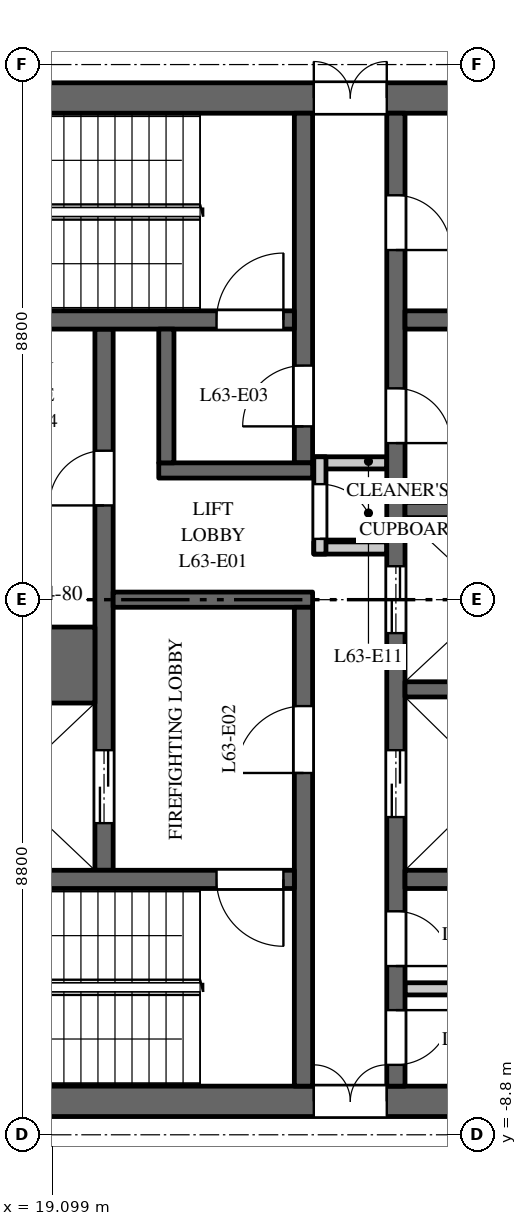
"""IFC4 building model, lengths in metres.
Left out: names, types, materials, properties, quantities, classifications, styles, units other than length and angle.
Written with IfcOpenShell. Run it as: python <this file> out.ifc"""

import sys

from ifc_helpers import new_model, si_unit, direction, frame, frame_2d, origin, place, context, subcontext, project, spatial, rectangle, extrude, element, fill, save


model = new_model("IFC4")
c1 = context("Model", 3, precision=1e-05, world=origin(), true_north=direction((0.0, 1.0)))
c2 = subcontext(c1, "Body", "Model", "MODEL_VIEW")
j1 = project(units=[si_unit("LENGTHUNIT", "METRE"), si_unit("PLANEANGLEUNIT", "RADIAN")], contexts=[c1])
p1 = place(None, origin())
s1 = spatial("IfcSite", under=j1, at=p1, CompositionType="ELEMENT")
p2 = place(p1, origin())
s2 = spatial("IfcBuilding", under=s1, at=p2, CompositionType="ELEMENT")
p3 = place(p2, frame((0.0, 0.0, 295.0)))
s3 = spatial("IfcBuildingStorey", under=s2, at=p3, CompositionType="ELEMENT", Elevation=295.0)
p4 = place(p3, frame((16.5, 8.25, 0.0), z_axis=(0.0, 0.0, 1.0), x_axis=(1.0, 0.0, 0.0)))
e1 = element("IfcWall", 1, at=p4, inside=s3, PredefinedType="SHEAR", context=c2, shape_type="SweptSolid", body=[
    extrude(rectangle(XDim=15.0, YDim=0.5, at=frame_2d((7.5, 0.0))), origin(), (0.0, 0.0, 1.0), 3.7),
])
p5 = place(p4, frame((6.9, 0.0, 0.0)))
e2 = element("IfcOpeningElement", 2, at=p5, cuts=e1, PredefinedType="OPENING", context=c2, shape_type="SweptSolid", body=[
    extrude(rectangle(XDim=1.2, YDim=2.1, at=frame_2d((0.6, 1.05))), frame((0.0, 0.26, 0.0), z_axis=(0.0, -1.0, 0.0), x_axis=(1.0, 0.0, 0.0)), (0.0, 0.0, 1.0), 0.52),
])
p6 = place(p4, frame((12.95, 0.0, 0.0)))
e3 = element("IfcOpeningElement", 3, at=p6, cuts=e1, PredefinedType="OPENING", context=c2, shape_type="SweptSolid", body=[
    extrude(rectangle(XDim=0.9, YDim=2.1, at=frame_2d((0.45, 1.05))), frame((0.0, 0.26, 0.0), z_axis=(0.0, -1.0, 0.0), x_axis=(1.0, 0.0, 0.0)), (0.0, 0.0, 1.0), 0.52),
])
p7 = place(p3, frame((16.5, -8.25, 0.0), z_axis=(0.0, 0.0, 1.0), x_axis=(1.0, 0.0, 0.0)))
e4 = element("IfcWall", 4, at=p7, inside=s3, PredefinedType="SHEAR", context=c2, shape_type="SweptSolid", body=[
    extrude(rectangle(XDim=15.0, YDim=0.5, at=frame_2d((7.5, 0.0))), origin(), (0.0, 0.0, 1.0), 3.7),
])
p8 = place(p7, frame((6.9, 0.0, 0.0)))
e5 = element("IfcOpeningElement", 5, at=p8, cuts=e4, PredefinedType="OPENING", context=c2, shape_type="SweptSolid", body=[
    extrude(rectangle(XDim=1.2, YDim=2.1, at=frame_2d((0.6, 1.05))), frame((0.0, 0.26, 0.0), z_axis=(0.0, -1.0, 0.0), x_axis=(1.0, 0.0, 0.0)), (0.0, 0.0, 1.0), 0.52),
])
p9 = place(p7, frame((12.275, 0.0, 0.0)))
e6 = element("IfcOpeningElement", 6, at=p9, cuts=e4, PredefinedType="OPENING", context=c2, shape_type="SweptSolid", body=[
    extrude(rectangle(XDim=0.9, YDim=2.1, at=frame_2d((0.45, 1.05))), frame((0.0, 0.26, 0.0), z_axis=(0.0, -1.0, 0.0), x_axis=(1.0, 0.0, 0.0)), (0.0, 0.0, 1.0), 0.52),
])
p10 = place(p3, frame((19.95, -4.45, 0.0), z_axis=(0.0, 0.0, 1.0), x_axis=(0.0, 1.0, 0.0)))
e7 = element("IfcWall", 7, at=p10, inside=s3, PredefinedType="SHEAR", context=c2, shape_type="SweptSolid", body=[
    extrude(rectangle(XDim=8.9, YDim=0.3, at=frame_2d((4.45, 0.0))), origin(), (0.0, 0.0, 1.0), 3.7),
])
p11 = place(p10, frame((0.775, 0.0, 0.0)))
e8 = element("IfcOpeningElement", 8, at=p11, cuts=e7, PredefinedType="OPENING", context=c2, shape_type="SweptSolid", body=[
    extrude(rectangle(XDim=1.2, YDim=2.1, at=frame_2d((0.6, 1.05))), frame((0.0, 0.16, 0.0), z_axis=(0.0, -1.0, 0.0), x_axis=(1.0, 0.0, 0.0)), (0.0, 0.0, 1.0), 0.32),
])
p12 = place(p10, frame((6.0, 0.0, 0.0)))
e9 = element("IfcOpeningElement", 9, at=p12, cuts=e7, PredefinedType="OPENING", context=c2, shape_type="SweptSolid", body=[
    extrude(rectangle(XDim=0.9, YDim=2.1, at=frame_2d((0.45, 1.05))), frame((0.0, 0.16, 0.0), z_axis=(0.0, -1.0, 0.0), x_axis=(1.0, 0.0, 0.0)), (0.0, 0.0, 1.0), 0.32),
])
p13 = place(p3, frame((24.75, -8.0, 0.0), z_axis=(0.0, 0.0, 1.0), x_axis=(0.0, 1.0, 0.0)))
e10 = element("IfcWall", 10, at=p13, inside=s3, PredefinedType="SHEAR", context=c2, shape_type="SweptSolid", body=[
    extrude(rectangle(XDim=16.0, YDim=0.3, at=frame_2d((8.0, 0.0))), origin(), (0.0, 0.0, 1.0), 3.7),
])
p14 = place(p13, frame((4.425, 0.0, 0.0)))
e11 = element("IfcOpeningElement", 11, at=p14, cuts=e10, PredefinedType="OPENING", context=c2, shape_type="SweptSolid", body=[
    extrude(rectangle(XDim=1.1, YDim=2.1, at=frame_2d((0.55, 1.05))), frame((0.0, 0.16, 0.0), z_axis=(0.0, -1.0, 0.0), x_axis=(1.0, 0.0, 0.0)), (0.0, 0.0, 1.0), 0.32),
])
p15 = place(p13, frame((7.45, 0.0, 0.0)))
e12 = element("IfcOpeningElement", 12, at=p15, cuts=e10, PredefinedType="OPENING", context=c2, shape_type="SweptSolid", body=[
    extrude(rectangle(XDim=1.1, YDim=2.1, at=frame_2d((0.55, 1.05))), frame((0.0, 0.16, 0.0), z_axis=(0.0, -1.0, 0.0), x_axis=(1.0, 0.0, 0.0)), (0.0, 0.0, 1.0), 0.32),
])
p16 = place(p13, frame((10.575, 0.0, 0.0)))
e13 = element("IfcOpeningElement", 13, at=p16, cuts=e10, PredefinedType="OPENING", context=c2, shape_type="SweptSolid", body=[
    extrude(rectangle(XDim=0.9, YDim=2.1, at=frame_2d((0.45, 1.05))), frame((0.0, 0.16, 0.0), z_axis=(0.0, -1.0, 0.0), x_axis=(1.0, 0.0, 0.0)), (0.0, 0.0, 1.0), 0.32),
])
p17 = place(p13, frame((13.75, 0.0, 0.0)))
e14 = element("IfcOpeningElement", 14, at=p17, cuts=e10, PredefinedType="OPENING", context=c2, shape_type="SweptSolid", body=[
    extrude(rectangle(XDim=0.9, YDim=2.1, at=frame_2d((0.45, 1.05))), frame((0.0, 0.16, 0.0), z_axis=(0.0, -1.0, 0.0), x_axis=(1.0, 0.0, 0.0)), (0.0, 0.0, 1.0), 0.32),
])
p18 = place(p13, frame((1.975, 0.0, 0.0)))
e15 = element("IfcOpeningElement", 15, at=p18, cuts=e10, PredefinedType="OPENING", context=c2, shape_type="SweptSolid", body=[
    extrude(rectangle(XDim=0.9, YDim=2.1, at=frame_2d((0.45, 1.05))), frame((0.0, 0.16, 0.0), z_axis=(0.0, -1.0, 0.0), x_axis=(1.0, 0.0, 0.0)), (0.0, 0.0, 1.0), 0.32),
])
p19 = place(p13, frame((0.35, 0.0, 0.0)))
e16 = element("IfcOpeningElement", 16, at=p19, cuts=e10, PredefinedType="OPENING", context=c2, shape_type="SweptSolid", body=[
    extrude(rectangle(XDim=0.9, YDim=2.1, at=frame_2d((0.45, 1.05))), frame((0.0, 0.16, 0.0), z_axis=(0.0, -1.0, 0.0), x_axis=(1.0, 0.0, 0.0)), (0.0, 0.0, 1.0), 0.32),
])
p20 = place(p3, frame((20.1, 0.0, 0.0), z_axis=(0.0, 0.0, 1.0), x_axis=(1.0, 0.0, 0.0)))
e17 = element("IfcWall", 17, at=p20, inside=s3, PredefinedType="SHEAR", context=c2, shape_type="SweptSolid", body=[
    extrude(rectangle(XDim=3.28, YDim=0.25, at=frame_2d((1.64, 0.0))), origin(), (0.0, 0.0, 1.0), 3.7),
])
for number, where, z_axis, x_axis in (
    (18, (23.4, 0.85, 0.0), (0.0, 0.0, 1.0), (1.0, 0.0, 0.0)),
    (19, (23.4, 2.25, 0.0), (0.0, 0.0, 1.0), (1.0, 0.0, 0.0)),
):
    element("IfcWall", number, at=place(p3, frame(where, z_axis=z_axis, x_axis=x_axis)), inside=s3, PredefinedType="PARTITIONING", context=c2, shape_type="SweptSolid", body=[
        extrude(rectangle(XDim=1.2, YDim=0.2, at=frame_2d((0.6, 0.0))), origin(), (0.0, 0.0, 1.0), 3.7),
    ])
p21 = place(p3, frame((23.5, 0.75, 0.0), z_axis=(0.0, 0.0, 1.0), x_axis=(0.0, 1.0, 0.0)))
e20 = element("IfcWall", 20, at=p21, inside=s3, PredefinedType="PARTITIONING", context=c2, shape_type="SweptSolid", body=[
    extrude(rectangle(XDim=1.6, YDim=0.2, at=frame_2d((0.8, 0.0))), origin(), (0.0, 0.0, 1.0), 3.7),
])
p22 = place(p21, frame((0.25, 0.0, 0.0)))
e21 = element("IfcOpeningElement", 21, at=p22, cuts=e20, PredefinedType="OPENING", context=c2, shape_type="SweptSolid", body=[
    extrude(rectangle(XDim=0.9, YDim=2.1, at=frame_2d((0.45, 1.05))), frame((0.0, 0.11, 0.0), z_axis=(0.0, -1.0, 0.0), x_axis=(1.0, 0.0, 0.0)), (0.0, 0.0, 1.0), 0.22),
])
p23 = place(p3, frame((24.9, 4.6, 0.0), z_axis=(0.0, 0.0, 1.0), x_axis=(1.0, 0.0, 0.0)))
e22 = element("IfcWall", 22, at=p23, inside=s3, PredefinedType="SHEAR", context=c2, shape_type="SweptSolid", body=[
    extrude(rectangle(XDim=6.1, YDim=0.3, at=frame_2d((3.05, 0.0))), origin(), (0.0, 0.0, 1.0), 3.7),
])
p24 = place(p3, frame((24.9, -6.4, 0.0), z_axis=(0.0, 0.0, 1.0), x_axis=(1.0, 0.0, 0.0)))
e23 = element("IfcWall", 23, at=p24, inside=s3, PredefinedType="PARTITIONING", context=c2, shape_type="SweptSolid", body=[
    extrude(rectangle(XDim=2.35, YDim=0.2, at=frame_2d((1.175, 0.0))), origin(), (0.0, 0.0, 1.0), 3.7),
])
p25 = place(p3, frame((24.9, -4.6, 0.0), z_axis=(0.0, 0.0, 1.0), x_axis=(1.0, 0.0, 0.0)))
e24 = element("IfcWall", 24, at=p25, inside=s3, PredefinedType="SHEAR", context=c2, shape_type="SweptSolid", body=[
    extrude(rectangle(XDim=6.1, YDim=0.3, at=frame_2d((3.05, 0.0))), origin(), (0.0, 0.0, 1.0), 3.7),
])
p26 = place(p25, frame((4.2, 0.0, 0.0)))
e25 = element("IfcOpeningElement", 25, at=p26, cuts=e24, PredefinedType="OPENING", context=c2, shape_type="SweptSolid", body=[
    extrude(rectangle(XDim=0.9, YDim=2.1, at=frame_2d((0.45, 1.05))), frame((0.0, 0.16, 0.0), z_axis=(0.0, -1.0, 0.0), x_axis=(1.0, 0.0, 0.0)), (0.0, 0.0, 1.0), 0.32),
])
p27 = place(p3, frame((16.9, -1.075, 0.0), z_axis=(0.0, 0.0, 1.0), x_axis=(1.0, 0.0, 0.0)))
e26 = element("IfcWall", 26, at=p27, inside=s3, PredefinedType="SHEAR", context=c2, shape_type="SweptSolid", body=[
    extrude(rectangle(XDim=2.9, YDim=1.25, at=frame_2d((1.45, 0.0))), origin(), (0.0, 0.0, 1.0), 3.7),
])
for number, where, z_axis, x_axis in (
    (27, (24.9, -1.475, 0.0), (0.0, 0.0, 1.0), (1.0, 0.0, 0.0)),
    (28, (24.9, 1.475, 0.0), (0.0, 0.0, 1.0), (1.0, 0.0, 0.0)),
):
    element("IfcWall", number, at=place(p3, frame(where, z_axis=z_axis, x_axis=x_axis)), inside=s3, PredefinedType="SHEAR", context=c2, shape_type="SweptSolid", body=[
        extrude(rectangle(XDim=2.9, YDim=0.25, at=frame_2d((1.45, 0.0))), origin(), (0.0, 0.0, 1.0), 3.7),
    ])
p28 = place(p3, frame((23.23, 2.25, 0.0), z_axis=(0.0, 0.0, 1.0), x_axis=(0.0, 1.0, 0.0)))
e29 = element("IfcWall", 29, at=p28, inside=s3, PredefinedType="SHEAR", context=c2, shape_type="SweptSolid", body=[
    extrude(rectangle(XDim=5.75, YDim=0.3, at=frame_2d((2.875, 0.0))), origin(), (0.0, 0.0, 1.0), 3.7),
])
p29 = place(p28, frame((0.6, 0.0, 0.0)))
e30 = element("IfcOpeningElement", 30, at=p29, cuts=e29, PredefinedType="OPENING", context=c2, shape_type="SweptSolid", body=[
    extrude(rectangle(XDim=1.0, YDim=2.1, at=frame_2d((0.5, 1.05))), frame((0.0, 0.16, 0.0), z_axis=(0.0, -1.0, 0.0), x_axis=(1.0, 0.0, 0.0)), (0.0, 0.0, 1.0), 0.32),
])
p30 = place(p3, frame((23.23, -8.0, 0.0), z_axis=(0.0, 0.0, 1.0), x_axis=(0.0, 1.0, 0.0)))
e31 = element("IfcWall", 31, at=p30, inside=s3, PredefinedType="SHEAR", context=c2, shape_type="SweptSolid", body=[
    extrude(rectangle(XDim=7.875, YDim=0.3, at=frame_2d((3.938, 0.0))), origin(), (0.0, 0.0, 1.0), 3.7),
])
p31 = place(p30, frame((5.15, 0.0, 0.0)))
e32 = element("IfcOpeningElement", 32, at=p31, cuts=e31, PredefinedType="OPENING", context=c2, shape_type="SweptSolid", body=[
    extrude(rectangle(XDim=1.1, YDim=2.1, at=frame_2d((0.55, 1.05))), frame((0.0, 0.16, 0.0), z_axis=(0.0, -1.0, 0.0), x_axis=(1.0, 0.0, 0.0)), (0.0, 0.0, 1.0), 0.32),
])
p32 = place(p3, frame((16.9, 4.6, 0.0), z_axis=(0.0, 0.0, 1.0), x_axis=(1.0, 0.0, 0.0)))
e33 = element("IfcWall", 33, at=p32, inside=s3, PredefinedType="SHEAR", context=c2, shape_type="SweptSolid", body=[
    extrude(rectangle(XDim=6.18, YDim=0.3, at=frame_2d((3.09, 0.0))), origin(), (0.0, 0.0, 1.0), 3.7),
])
p33 = place(p32, frame((4.9, 0.0, 0.0)))
e34 = element("IfcOpeningElement", 34, at=p33, cuts=e33, PredefinedType="OPENING", context=c2, shape_type="SweptSolid", body=[
    extrude(rectangle(XDim=1.1, YDim=2.1, at=frame_2d((0.55, 1.05))), frame((0.0, 0.16, 0.0), z_axis=(0.0, -1.0, 0.0), x_axis=(1.0, 0.0, 0.0)), (0.0, 0.0, 1.0), 0.32),
])
p34 = place(p3, frame((16.9, -4.6, 0.0), z_axis=(0.0, 0.0, 1.0), x_axis=(1.0, 0.0, 0.0)))
e35 = element("IfcWall", 35, at=p34, inside=s3, PredefinedType="SHEAR", context=c2, shape_type="SweptSolid", body=[
    extrude(rectangle(XDim=6.18, YDim=0.3, at=frame_2d((3.09, 0.0))), origin(), (0.0, 0.0, 1.0), 3.7),
])
p35 = place(p34, frame((4.9, 0.0, 0.0)))
e36 = element("IfcOpeningElement", 36, at=p35, cuts=e35, PredefinedType="OPENING", context=c2, shape_type="SweptSolid", body=[
    extrude(rectangle(XDim=1.1, YDim=2.1, at=frame_2d((0.55, 1.05))), frame((0.0, 0.16, 0.0), z_axis=(0.0, -1.0, 0.0), x_axis=(1.0, 0.0, 0.0)), (0.0, 0.0, 1.0), 0.32),
])
p36 = place(p3, frame((20.85, 2.125, 0.0), z_axis=(0.0, 0.0, 1.0), x_axis=(1.0, 0.0, 0.0)))
e37 = element("IfcWall", 37, at=p36, inside=s3, PredefinedType="SHEAR", context=c2, shape_type="SweptSolid", body=[
    extrude(rectangle(XDim=2.53, YDim=0.25, at=frame_2d((1.265, 0.0))), origin(), (0.0, 0.0, 1.0), 3.7),
])
p37 = place(p3, frame((20.975, 2.25, 0.0), z_axis=(0.0, 0.0, 1.0), x_axis=(0.0, 1.0, 0.0)))
e38 = element("IfcWall", 38, at=p37, inside=s3, PredefinedType="SHEAR", context=c2, shape_type="SweptSolid", body=[
    extrude(rectangle(XDim=2.2, YDim=0.25, at=frame_2d((1.1, 0.0))), origin(), (0.0, 0.0, 1.0), 3.7),
])
p38 = place(p11, origin())
e39 = element("IfcDoor", 39, at=p38, inside=s3, OperationType="DOUBLE_DOOR_SLIDING", PredefinedType="DOOR", context=c2, shape_type="SweptSolid", body=[
    extrude(rectangle(XDim=1.2, YDim=2.1, at=frame_2d((0.6, 1.05))), frame((0.0, 0.025, 0.0), z_axis=(0.0, -1.0, 0.0), x_axis=(1.0, 0.0, 0.0)), (0.0, 0.0, 1.0), 0.05),
])
fill(e8, e39)
p39 = place(p14, origin())
e40 = element("IfcDoor", 40, at=p39, inside=s3, OperationType="DOUBLE_DOOR_SLIDING", PredefinedType="DOOR", context=c2, shape_type="SweptSolid", body=[
    extrude(rectangle(XDim=1.1, YDim=2.1, at=frame_2d((0.55, 1.05))), frame((0.0, 0.025, 0.0), z_axis=(0.0, -1.0, 0.0), x_axis=(1.0, 0.0, 0.0)), (0.0, 0.0, 1.0), 0.05),
])
fill(e11, e40)
p40 = place(p15, origin())
e41 = element("IfcDoor", 41, at=p40, inside=s3, OperationType="DOUBLE_DOOR_SLIDING", PredefinedType="DOOR", context=c2, shape_type="SweptSolid", body=[
    extrude(rectangle(XDim=1.1, YDim=2.1, at=frame_2d((0.55, 1.05))), frame((0.0, 0.025, 0.0), z_axis=(0.0, -1.0, 0.0), x_axis=(1.0, 0.0, 0.0)), (0.0, 0.0, 1.0), 0.05),
])
fill(e12, e41)
p41 = place(p33, origin())
e42 = element("IfcDoor", 42, at=p41, inside=s3, OperationType="SINGLE_SWING_LEFT", PredefinedType="DOOR", context=c2, shape_type="SweptSolid", body=[
    extrude(rectangle(XDim=1.1, YDim=2.1, at=frame_2d((0.55, 1.05))), frame((0.0, 0.025, 0.0), z_axis=(0.0, -1.0, 0.0), x_axis=(1.0, 0.0, 0.0)), (0.0, 0.0, 1.0), 0.05),
])
fill(e34, e42)
p42 = place(p35, origin())
e43 = element("IfcDoor", 43, at=p42, inside=s3, OperationType="SINGLE_SWING_RIGHT", PredefinedType="DOOR", context=c2, shape_type="SweptSolid", body=[
    extrude(rectangle(XDim=1.1, YDim=2.1, at=frame_2d((0.55, 1.05))), frame((0.0, 0.025, 0.0), z_axis=(0.0, -1.0, 0.0), x_axis=(1.0, 0.0, 0.0)), (0.0, 0.0, 1.0), 0.05),
])
fill(e36, e43)
p43 = place(p31, origin())
e44 = element("IfcDoor", 44, at=p43, inside=s3, OperationType="SINGLE_SWING_RIGHT", PredefinedType="DOOR", context=c2, shape_type="SweptSolid", body=[
    extrude(rectangle(XDim=1.1, YDim=2.1, at=frame_2d((0.55, 1.05))), frame((0.0, 0.025, 0.0), z_axis=(0.0, -1.0, 0.0), x_axis=(1.0, 0.0, 0.0)), (0.0, 0.0, 1.0), 0.05),
])
fill(e32, e44)
p44 = place(p29, origin())
e45 = element("IfcDoor", 45, at=p44, inside=s3, OperationType="SINGLE_SWING_RIGHT", PredefinedType="DOOR", context=c2, shape_type="SweptSolid", body=[
    extrude(rectangle(XDim=1.0, YDim=2.1, at=frame_2d((0.5, 1.05))), frame((0.0, 0.025, 0.0), z_axis=(0.0, -1.0, 0.0), x_axis=(1.0, 0.0, 0.0)), (0.0, 0.0, 1.0), 0.05),
])
fill(e30, e45)
p45 = place(p5, origin())
e46 = element("IfcDoor", 46, at=p45, inside=s3, OperationType="DOUBLE_DOOR_DOUBLE_SWING", PredefinedType="DOOR", context=c2, shape_type="SweptSolid", body=[
    extrude(rectangle(XDim=1.2, YDim=2.1, at=frame_2d((0.6, 1.05))), frame((0.0, 0.025, 0.0), z_axis=(0.0, -1.0, 0.0), x_axis=(1.0, 0.0, 0.0)), (0.0, 0.0, 1.0), 0.05),
])
fill(e2, e46)
p46 = place(p8, origin())
e47 = element("IfcDoor", 47, at=p46, inside=s3, OperationType="DOUBLE_DOOR_DOUBLE_SWING", PredefinedType="DOOR", context=c2, shape_type="SweptSolid", body=[
    extrude(rectangle(XDim=1.2, YDim=2.1, at=frame_2d((0.6, 1.05))), frame((0.0, 0.025, 0.0), z_axis=(0.0, -1.0, 0.0), x_axis=(1.0, 0.0, 0.0)), (0.0, 0.0, 1.0), 0.05),
])
fill(e5, e47)
p47 = place(p12, origin())
e48 = element("IfcDoor", 48, at=p47, inside=s3, OperationType="SINGLE_SWING_RIGHT", PredefinedType="DOOR", context=c2, shape_type="SweptSolid", body=[
    extrude(rectangle(XDim=0.9, YDim=2.1, at=frame_2d((0.45, 1.05))), frame((0.0, 0.025, 0.0), z_axis=(0.0, -1.0, 0.0), x_axis=(1.0, 0.0, 0.0)), (0.0, 0.0, 1.0), 0.05),
])
fill(e9, e48)
p48 = place(p16, origin())
e49 = element("IfcDoor", 49, at=p48, inside=s3, OperationType="SINGLE_SWING_LEFT", PredefinedType="DOOR", context=c2, shape_type="SweptSolid", body=[
    extrude(rectangle(XDim=0.9, YDim=2.1, at=frame_2d((0.45, 1.05))), frame((0.0, 0.025, 0.0), z_axis=(0.0, -1.0, 0.0), x_axis=(1.0, 0.0, 0.0)), (0.0, 0.0, 1.0), 0.05),
])
fill(e13, e49)
p49 = place(p17, origin())
e50 = element("IfcDoor", 50, at=p49, inside=s3, OperationType="SINGLE_SWING_LEFT", PredefinedType="DOOR", context=c2, shape_type="SweptSolid", body=[
    extrude(rectangle(XDim=0.9, YDim=2.1, at=frame_2d((0.45, 1.05))), frame((0.0, 0.025, 0.0), z_axis=(0.0, -1.0, 0.0), x_axis=(1.0, 0.0, 0.0)), (0.0, 0.0, 1.0), 0.05),
])
fill(e14, e50)
p50 = place(p18, origin())
e51 = element("IfcDoor", 51, at=p50, inside=s3, OperationType="SINGLE_SWING_LEFT", PredefinedType="DOOR", context=c2, shape_type="SweptSolid", body=[
    extrude(rectangle(XDim=0.9, YDim=2.1, at=frame_2d((0.45, 1.05))), frame((0.0, 0.025, 0.0), z_axis=(0.0, -1.0, 0.0), x_axis=(1.0, 0.0, 0.0)), (0.0, 0.0, 1.0), 0.05),
])
fill(e15, e51)
p51 = place(p19, origin())
e52 = element("IfcDoor", 52, at=p51, inside=s3, OperationType="SINGLE_SWING_RIGHT", PredefinedType="DOOR", context=c2, shape_type="SweptSolid", body=[
    extrude(rectangle(XDim=0.9, YDim=2.1, at=frame_2d((0.45, 1.05))), frame((0.0, 0.025, 0.0), z_axis=(0.0, -1.0, 0.0), x_axis=(1.0, 0.0, 0.0)), (0.0, 0.0, 1.0), 0.05),
])
fill(e16, e52)
p52 = place(p22, origin())
e53 = element("IfcDoor", 53, at=p52, inside=s3, OperationType="SINGLE_SWING_LEFT", PredefinedType="DOOR", context=c2, shape_type="SweptSolid", body=[
    extrude(rectangle(XDim=0.9, YDim=2.1, at=frame_2d((0.45, 1.05))), frame((0.0, 0.025, 0.0), z_axis=(0.0, -1.0, 0.0), x_axis=(1.0, 0.0, 0.0)), (0.0, 0.0, 1.0), 0.05),
])
fill(e21, e53)
save(model, sys.argv[1])
